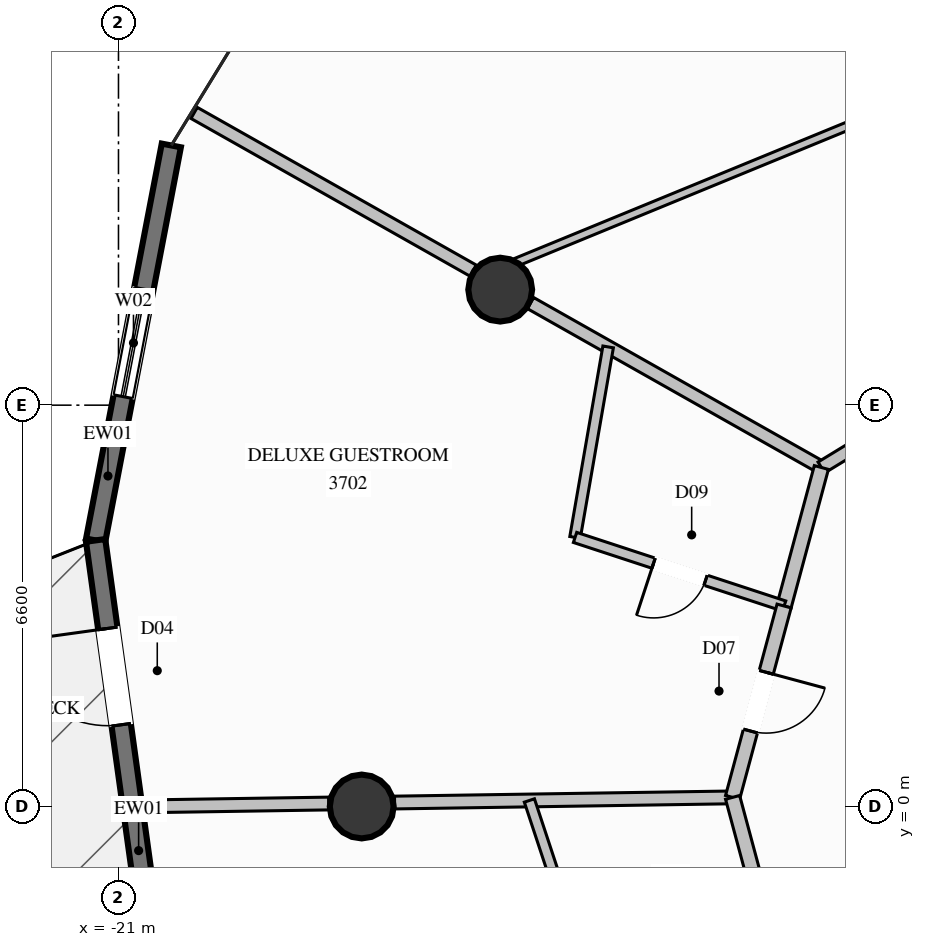
"""IFC4 building model, lengths in metres.
Left out: names, types, materials, properties, quantities, classifications, styles, units other than length and angle.
Written with IfcOpenShell. Run it as: python <this file> out.ifc"""

import sys

from ifc_helpers import new_model, si_unit, direction, frame, frame_2d, origin, origin_2d, place, context, subcontext, project, spatial, rectangle, circle, extrude, element, fill, save


model = new_model("IFC4")
c1 = context("Model", 3, precision=1e-05, world=origin(), true_north=direction((0.0, 1.0)))
c2 = subcontext(c1, "Body", "Model", "MODEL_VIEW")
j1 = project(units=[si_unit("LENGTHUNIT", "METRE"), si_unit("PLANEANGLEUNIT", "RADIAN")], contexts=[c1])
p1 = place(None, origin())
s1 = spatial("IfcSite", under=j1, at=p1, CompositionType="ELEMENT")
p2 = place(p1, origin())
s2 = spatial("IfcBuilding", under=s1, at=p2, CompositionType="ELEMENT")
p3 = place(p2, frame((0.0, 0.0, 138.6)))
s3 = spatial("IfcBuildingStorey", under=s2, at=p3, CompositionType="ELEMENT", Elevation=138.6)
for number, where, z_axis, x_axis in (
    (1, (-14.722, 8.5, 0.0), (0.0, 0.0, 1.0), (1.0, 0.0, 0.0)),
    (2, (-17.0, 0.0, 0.0), (0.0, 0.0, 1.0), (1.0, 0.0, 0.0)),
):
    element("IfcColumn", number, at=place(p3, frame(where, z_axis=z_axis, x_axis=x_axis)), inside=s3, PredefinedType="COLUMN", context=c2, shape_type="SweptSolid", body=[
        extrude(circle(Radius=0.525, at=origin_2d()), origin(), (0.0, 0.0, 1.0), 3.6),
    ])
p4 = place(p3, frame((-21.376, 4.376, 0.0), z_axis=(0.0, 0.0, 1.0), x_axis=(0.188236683123, 0.982123694413, 0.0)))
e3 = element("IfcWall", 3, at=p4, inside=s3, PredefinedType="SOLIDWALL", context=c2, shape_type="SweptSolid", body=[
    extrude(rectangle(XDim=6.613, YDim=0.32, at=frame_2d((3.307, 0.0))), origin(), (0.0, 0.0, 1.0), 3.35),
])
p5 = place(p4, frame((2.407, 0.0, 0.35)))
e4 = element("IfcOpeningElement", 4, at=p5, cuts=e3, PredefinedType="OPENING", context=c2, shape_type="SweptSolid", body=[
    extrude(rectangle(XDim=1.8, YDim=2.6, at=frame_2d((0.9, 1.3))), frame((0.0, 0.17, 0.0), z_axis=(0.0, -1.0, 0.0), x_axis=(1.0, 0.0, 0.0)), (0.0, 0.0, 1.0), 0.34),
])
p6 = place(p3, frame((-20.416, -2.547, 0.0), z_axis=(0.0, 0.0, 1.0), x_axis=(-0.13734656866, 0.990523053784, 0.0)))
e5 = element("IfcWall", 5, at=p6, inside=s3, PredefinedType="SOLIDWALL", context=c2, shape_type="SweptSolid", body=[
    extrude(rectangle(XDim=6.989, YDim=0.32, at=frame_2d((3.495, 0.0))), origin(), (0.0, 0.0, 1.0), 3.35),
])
p7 = place(p6, frame((3.928, 0.0, 0.0)))
e6 = element("IfcOpeningElement", 6, at=p7, cuts=e5, PredefinedType="OPENING", context=c2, shape_type="SweptSolid", body=[
    extrude(rectangle(XDim=1.6, YDim=2.3, at=frame_2d((0.8, 1.15))), frame((0.0, 0.17, 0.0), z_axis=(0.0, -1.0, 0.0), x_axis=(1.0, 0.0, 0.0)), (0.0, 0.0, 1.0), 0.34),
])
p8 = place(p3, frame((-9.44, 5.575, 0.0), z_axis=(0.0, 0.0, 1.0), x_axis=(-0.87056283872, 0.492057256668, 0.0)))
e7 = element("IfcWall", 7, at=p8, inside=s3, PredefinedType="PARTITIONING", context=c2, shape_type="SweptSolid", body=[
    extrude(rectangle(XDim=5.496, YDim=0.21, at=frame_2d((2.748, 0.0))), origin(), (0.0, 0.0, 1.0), 2.791),
])
p9 = place(p3, frame((-15.168, 8.813, 0.0), z_axis=(0.0, 0.0, 1.0), x_axis=(-0.870585270254, 0.492017567997, 0.0)))
e8 = element("IfcWall", 8, at=p9, inside=s3, PredefinedType="PARTITIONING", context=c2, shape_type="SweptSolid", body=[
    extrude(rectangle(XDim=5.27, YDim=0.21, at=frame_2d((2.635, 0.0))), origin(), (0.0, 0.0, 1.0), 3.35),
])
p10 = place(p3, frame((-10.9, 0.15, 0.0), z_axis=(0.0, 0.0, 1.0), x_axis=(-0.999883231323, -0.01528148285, 0.0)))
e9 = element("IfcWall", 9, at=p10, inside=s3, PredefinedType="PARTITIONING", context=c2, shape_type="SweptSolid", body=[
    extrude(rectangle(XDim=5.56, YDim=0.21, at=frame_2d((2.78, 0.0))), origin(), (0.0, 0.0, 1.0), 3.35),
])
p11 = place(p3, frame((-17.543, 0.049, 0.0), z_axis=(0.0, 0.0, 1.0), x_axis=(-0.999881405695, -0.015400472226, 0.0)))
e10 = element("IfcWall", 10, at=p11, inside=s3, PredefinedType="PARTITIONING", context=c2, shape_type="SweptSolid", body=[
    extrude(rectangle(XDim=3.187, YDim=0.21, at=frame_2d((1.593, 0.0))), origin(), (0.0, 0.0, 1.0), 3.35),
])
p12 = place(p3, frame((-9.44, 5.575, 0.0), z_axis=(0.0, 0.0, 1.0), x_axis=(0.853641534933, 0.520860950579, 0.0)))
e11 = element("IfcWall", 11, at=p12, inside=s3, PredefinedType="PARTITIONING", context=c2, shape_type="SweptSolid", body=[
    extrude(rectangle(XDim=2.448, YDim=0.21, at=frame_2d((1.224, 0.0))), origin(), (0.0, 0.0, 1.0), 3.35),
])
p13 = place(p3, frame((-15.011, 8.724, 0.0), z_axis=(0.0, 0.0, 1.0), x_axis=(0.925008016351, 0.379947588078, 0.0)))
e12 = element("IfcWall", 12, at=p13, inside=s3, PredefinedType="PARTITIONING", context=c2, shape_type="SweptSolid", body=[
    extrude(rectangle(XDim=16.228, YDim=0.135, at=frame_2d((8.114, 0.0))), origin(), (0.0, 0.0, 1.0), 2.878),
])
p14 = place(p13, frame((7.639, 0.0, 0.0)))
e13 = element("IfcOpeningElement", 13, at=p14, cuts=e12, PredefinedType="OPENING", context=c2, shape_type="SweptSolid", body=[
    extrude(rectangle(XDim=0.95, YDim=2.1, at=frame_2d((0.475, 1.05))), frame((0.0, 0.078, 0.0), z_axis=(0.0, -1.0, 0.0), x_axis=(1.0, 0.0, 0.0)), (0.0, 0.0, 1.0), 0.155),
])
p15 = place(p3, frame((-9.44, 5.575, 0.0), z_axis=(0.0, 0.0, 1.0), x_axis=(-0.25988439237, -0.965639737481, 0.0)))
e14 = element("IfcWall", 14, at=p15, inside=s3, PredefinedType="PARTITIONING", context=c2, shape_type="SweptSolid", body=[
    extrude(rectangle(XDim=2.359, YDim=0.24, at=frame_2d((1.179, 0.0))), origin(), (0.0, 0.0, 1.0), 3.35),
])
p16 = place(p3, frame((-12.947, 7.558, 0.0), z_axis=(0.0, 0.0, 1.0), x_axis=(-0.171056041303, -0.985261300739, 0.0)))
e15 = element("IfcWall", 15, at=p16, inside=s3, PredefinedType="PLUMBINGWALL", context=c2, shape_type="SweptSolid", body=[
    extrude(rectangle(XDim=3.18, YDim=0.175, at=frame_2d((1.59, 0.0))), origin(), (0.0, 0.0, 1.0), 3.35),
])
p17 = place(p3, frame((-10.053, 3.297, 0.0), z_axis=(0.0, 0.0, 1.0), x_axis=(-0.950170580303, 0.31173044177, 0.0)))
e16 = element("IfcWall", 16, at=p17, inside=s3, PredefinedType="PLUMBINGWALL", context=c2, shape_type="SweptSolid", body=[
    extrude(rectangle(XDim=3.618, YDim=0.175, at=frame_2d((1.809, 0.0))), origin(), (0.0, 0.0, 1.0), 3.35),
])
p18 = place(p17, frame((1.359, 0.0, 0.0)))
e17 = element("IfcOpeningElement", 17, at=p18, cuts=e16, PredefinedType="OPENING", context=c2, shape_type="SweptSolid", body=[
    extrude(rectangle(XDim=0.9, YDim=2.1, at=frame_2d((0.45, 1.05))), frame((0.0, 0.098, 0.0), z_axis=(0.0, -1.0, 0.0), x_axis=(1.0, 0.0, 0.0)), (0.0, 0.0, 1.0), 0.195),
])
p19 = place(p3, frame((-10.053, 3.297, 0.0), z_axis=(0.0, 0.0, 1.0), x_axis=(-0.25985795735, -0.965646851598, 0.0)))
e18 = element("IfcWall", 18, at=p19, inside=s3, PredefinedType="PARTITIONING", context=c2, shape_type="SweptSolid", body=[
    extrude(rectangle(XDim=3.259, YDim=0.24, at=frame_2d((1.63, 0.0))), origin(), (0.0, 0.0, 1.0), 3.35),
])
p20 = place(p19, frame((1.129, 0.0, 0.0)))
e19 = element("IfcOpeningElement", 19, at=p20, cuts=e18, PredefinedType="OPENING", context=c2, shape_type="SweptSolid", body=[
    extrude(rectangle(XDim=1.0, YDim=2.2, at=frame_2d((0.5, 1.1))), frame((0.0, 0.13, 0.0), z_axis=(0.0, -1.0, 0.0), x_axis=(1.0, 0.0, 0.0)), (0.0, 0.0, 1.0), 0.26),
])
p21 = place(p3, frame((-10.9, 0.15, 0.0), z_axis=(0.0, 0.0, 1.0), x_axis=(0.259684059781, -0.965693631073, 0.0)))
e20 = element("IfcWall", 20, at=p21, inside=s3, PredefinedType="PARTITIONING", context=c2, shape_type="SweptSolid", body=[
    extrude(rectangle(XDim=2.36, YDim=0.24, at=frame_2d((1.18, 0.0))), origin(), (0.0, 0.0, 1.0), 3.35),
])
p22 = place(p3, frame((-14.242, 0.099, 0.0), z_axis=(0.0, 0.0, 1.0), x_axis=(0.313968220839, -0.949433492301, 0.0)))
e21 = element("IfcWall", 21, at=p22, inside=s3, PredefinedType="PLUMBINGWALL", context=c2, shape_type="SweptSolid", body=[
    extrude(rectangle(XDim=3.048, YDim=0.175, at=frame_2d((1.524, 0.0))), origin(), (0.0, 0.0, 1.0), 3.35),
])
p23 = place(p5, origin())
e22 = element("IfcWindow", 22, at=p23, inside=s3, PartitioningType="SINGLE_PANEL", PredefinedType="WINDOW", context=c2, shape_type="SweptSolid", body=[
    extrude(rectangle(XDim=1.8, YDim=2.6, at=frame_2d((0.9, 1.3))), frame((0.0, 0.03, 0.0), z_axis=(0.0, -1.0, 0.0), x_axis=(1.0, 0.0, 0.0)), (0.0, 0.0, 1.0), 0.06),
])
fill(e4, e22)
p24 = place(p7, origin())
e23 = element("IfcDoor", 23, at=p24, inside=s3, OperationType="SINGLE_SWING_RIGHT", PredefinedType="DOOR", context=c2, shape_type="SweptSolid", body=[
    extrude(rectangle(XDim=1.6, YDim=2.3, at=frame_2d((0.8, 1.15))), frame((0.0, 0.025, 0.0), z_axis=(0.0, -1.0, 0.0), x_axis=(1.0, 0.0, 0.0)), (0.0, 0.0, 1.0), 0.05),
])
fill(e6, e23)
p25 = place(p18, origin())
e24 = element("IfcDoor", 24, at=p25, inside=s3, OperationType="SINGLE_SWING_RIGHT", PredefinedType="DOOR", context=c2, shape_type="SweptSolid", body=[
    extrude(rectangle(XDim=0.9, YDim=2.1, at=frame_2d((0.45, 1.05))), frame((0.0, 0.025, 0.0), z_axis=(0.0, -1.0, 0.0), x_axis=(1.0, 0.0, 0.0)), (0.0, 0.0, 1.0), 0.05),
])
fill(e17, e24)
p26 = place(p20, origin())
e25 = element("IfcDoor", 25, at=p26, inside=s3, OperationType="SINGLE_SWING_LEFT", PredefinedType="DOOR", context=c2, shape_type="SweptSolid", body=[
    extrude(rectangle(XDim=1.0, YDim=2.2, at=frame_2d((0.5, 1.1))), frame((0.0, 0.025, 0.0), z_axis=(0.0, -1.0, 0.0), x_axis=(1.0, 0.0, 0.0)), (0.0, 0.0, 1.0), 0.05),
])
fill(e19, e25)
save(model, sys.argv[1])
